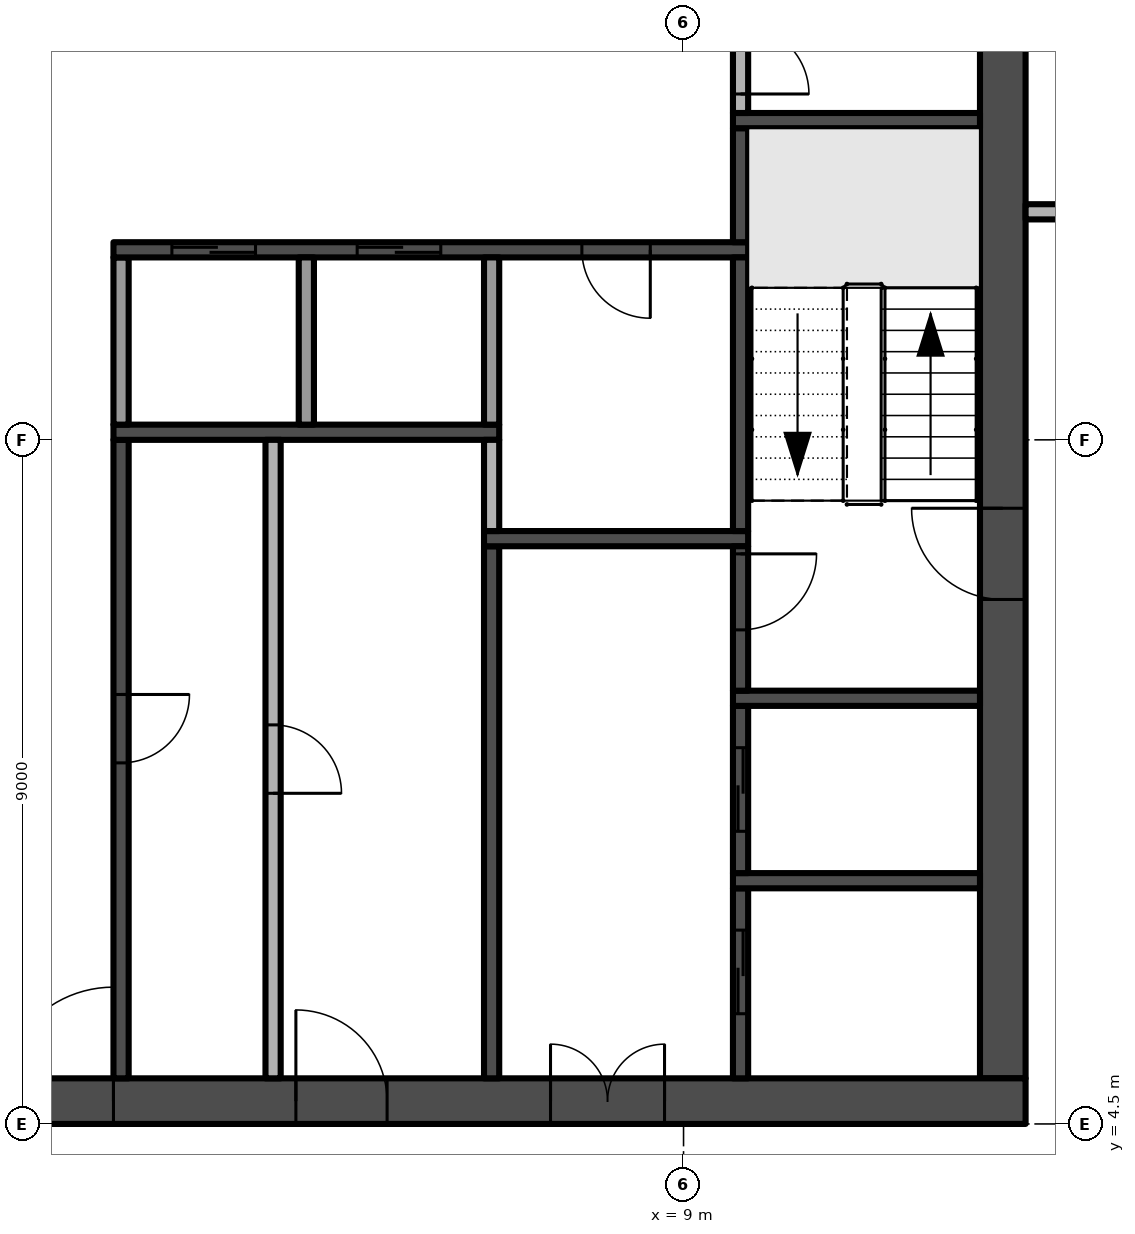
"""IFC4 building model, lengths in metres.
Left out: names, types, materials, properties, quantities, classifications, styles, units other than length and angle.
Written with IfcOpenShell. Run it as: python <this file> out.ifc"""

import sys

from ifc_helpers import new_model, si_unit, direction, frame, frame_2d, origin, place, context, subcontext, project, spatial, rectangle, extrude, element, fill, save


model = new_model("IFC4")
c1 = context("Model", 3, precision=1e-05, world=origin(), true_north=direction((0.0, 1.0)))
c2 = subcontext(c1, "Body", "Model", "MODEL_VIEW")
j1 = project(units=[si_unit("LENGTHUNIT", "METRE"), si_unit("PLANEANGLEUNIT", "RADIAN")], contexts=[c1])
p1 = place(None, origin())
s1 = spatial("IfcSite", under=j1, at=p1, CompositionType="ELEMENT")
p2 = place(p1, origin())
s2 = spatial("IfcBuilding", under=s1, at=p2, CompositionType="ELEMENT")
p3 = place(p2, frame((0.0, 0.0, 188.2)))
s3 = spatial("IfcBuildingStorey", under=s2, at=p3, CompositionType="ELEMENT", Elevation=188.2)
p4 = place(p3, frame((-13.5, 4.8, -0.3), z_axis=(0.0, 0.0, 1.0), x_axis=(1.0, 0.0, 0.0)))
e1 = element("IfcWall", 1, at=p4, inside=s3, PredefinedType="SHEAR", context=c2, shape_type="SweptSolid", body=[
    extrude(rectangle(XDim=27.0, YDim=0.6, at=frame_2d((13.5, 0.0))), origin(), (0.0, 0.0, 1.0), 3.8),
])
p5 = place(p4, frame((12.0, 0.0, 0.3)))
e2 = element("IfcOpeningElement", 2, at=p5, cuts=e1, PredefinedType="OPENING", context=c2, shape_type="SweptSolid", body=[
    extrude(rectangle(XDim=3.0, YDim=2.4, at=frame_2d((1.5, 1.2))), frame((0.0, 0.31, 0.0), z_axis=(0.0, -1.0, 0.0), x_axis=(1.0, 0.0, 0.0)), (0.0, 0.0, 1.0), 0.62),
])
p6 = place(p4, frame((4.9, 0.0, 0.3)))
e3 = element("IfcOpeningElement", 3, at=p6, cuts=e1, PredefinedType="OPENING", context=c2, shape_type="SweptSolid", body=[
    extrude(rectangle(XDim=1.2, YDim=2.2, at=frame_2d((0.6, 1.1))), frame((0.0, 0.31, 0.0), z_axis=(0.0, -1.0, 0.0), x_axis=(1.0, 0.0, 0.0)), (0.0, 0.0, 1.0), 0.62),
])
p7 = place(p4, frame((20.75, 0.0, 0.3)))
e4 = element("IfcOpeningElement", 4, at=p7, cuts=e1, PredefinedType="OPENING", context=c2, shape_type="SweptSolid", body=[
    extrude(rectangle(XDim=1.5, YDim=2.2, at=frame_2d((0.75, 1.1))), frame((0.0, 0.31, 0.0), z_axis=(0.0, -1.0, 0.0), x_axis=(1.0, 0.0, 0.0)), (0.0, 0.0, 1.0), 0.62),
])
p8 = place(p4, frame((17.4, 0.0, 0.3)))
e5 = element("IfcOpeningElement", 5, at=p8, cuts=e1, PredefinedType="OPENING", context=c2, shape_type="SweptSolid", body=[
    extrude(rectangle(XDim=1.2, YDim=2.2, at=frame_2d((0.6, 1.1))), frame((0.0, 0.31, 0.0), z_axis=(0.0, -1.0, 0.0), x_axis=(1.0, 0.0, 0.0)), (0.0, 0.0, 1.0), 0.62),
])
p9 = place(p3, frame((13.2, 5.1, -0.3), z_axis=(0.0, 0.0, 1.0), x_axis=(0.0, 1.0, 0.0)))
e6 = element("IfcWall", 6, at=p9, inside=s3, PredefinedType="SHEAR", context=c2, shape_type="SweptSolid", body=[
    extrude(rectangle(XDim=16.8, YDim=0.6, at=frame_2d((8.4, 0.0))), origin(), (0.0, 0.0, 1.0), 3.8),
])
p10 = place(p9, frame((6.3, 0.0, 0.3)))
e7 = element("IfcOpeningElement", 7, at=p10, cuts=e6, PredefinedType="OPENING", context=c2, shape_type="SweptSolid", body=[
    extrude(rectangle(XDim=1.2, YDim=2.2, at=frame_2d((0.6, 1.1))), frame((0.0, 0.31, 0.0), z_axis=(0.0, -1.0, 0.0), x_axis=(1.0, 0.0, 0.0)), (0.0, 0.0, 1.0), 0.62),
])
p11 = place(p3, frame((1.6, 13.5, 0.0), z_axis=(0.0, 0.0, 1.0), x_axis=(0.0, -1.0, 0.0)))
e8 = element("IfcWall", 8, at=p11, inside=s3, PredefinedType="SHEAR", context=c2, shape_type="SweptSolid", body=[
    extrude(rectangle(XDim=8.4, YDim=0.2, at=frame_2d((4.2, 0.0))), origin(), (0.0, 0.0, 1.0), 3.5),
])
p12 = place(p11, frame((3.35, 0.0, 0.0)))
e9 = element("IfcOpeningElement", 9, at=p12, cuts=e8, PredefinedType="OPENING", context=c2, shape_type="SweptSolid", body=[
    extrude(rectangle(XDim=0.9, YDim=2.1, at=frame_2d((0.45, 1.05))), frame((0.0, 0.11, 0.0), z_axis=(0.0, -1.0, 0.0), x_axis=(1.0, 0.0, 0.0)), (0.0, 0.0, 1.0), 0.22),
])
p13 = place(p3, frame((1.5, 13.6, 0.0), z_axis=(0.0, 0.0, 1.0), x_axis=(1.0, 0.0, 0.0)))
e10 = element("IfcWall", 10, at=p13, inside=s3, PredefinedType="SHEAR", context=c2, shape_type="SweptSolid", body=[
    extrude(rectangle(XDim=5.075, YDim=0.2, at=frame_2d((2.538, 0.0))), origin(), (0.0, 0.0, 1.0), 3.5),
])
p14 = place(p3, frame((1.6, 13.7, 0.0), z_axis=(0.0, 0.0, 1.0), x_axis=(0.0, 1.0, 0.0)))
e11 = element("IfcWall", 11, at=p14, inside=s3, PredefinedType="PARTITIONING", context=c2, shape_type="SweptSolid", body=[
    extrude(rectangle(XDim=2.2, YDim=0.2, at=frame_2d((1.1, 0.0))), origin(), (0.0, 0.0, 1.0), 3.5),
])
p15 = place(p3, frame((9.85, 16.0, 0.0), z_axis=(0.0, 0.0, 1.0), x_axis=(-1.0, 0.0, 0.0)))
e12 = element("IfcWall", 12, at=p15, inside=s3, PredefinedType="SHEAR", context=c2, shape_type="SweptSolid", body=[
    extrude(rectangle(XDim=8.35, YDim=0.2, at=frame_2d((4.175, 0.0))), origin(), (0.0, 0.0, 1.0), 3.5),
])
p16 = place(p15, frame((6.481, 0.0, 0.0)))
e13 = element("IfcOpeningElement", 13, at=p16, cuts=e12, PredefinedType="OPENING", context=c2, shape_type="SweptSolid", body=[
    extrude(rectangle(XDim=1.1, YDim=2.1, at=frame_2d((0.55, 1.05))), frame((0.0, 0.11, 0.0), z_axis=(0.0, -1.0, 0.0), x_axis=(1.0, 0.0, 0.0)), (0.0, 0.0, 1.0), 0.22),
])
p17 = place(p15, frame((4.044, 0.0, 0.0)))
e14 = element("IfcOpeningElement", 14, at=p17, cuts=e12, PredefinedType="OPENING", context=c2, shape_type="SweptSolid", body=[
    extrude(rectangle(XDim=1.1, YDim=2.1, at=frame_2d((0.55, 1.05))), frame((0.0, 0.11, 0.0), z_axis=(0.0, -1.0, 0.0), x_axis=(1.0, 0.0, 0.0)), (0.0, 0.0, 1.0), 0.22),
])
p18 = place(p15, frame((1.288, 0.0, 0.0)))
e15 = element("IfcOpeningElement", 15, at=p18, cuts=e12, PredefinedType="OPENING", context=c2, shape_type="SweptSolid", body=[
    extrude(rectangle(XDim=0.9, YDim=2.1, at=frame_2d((0.45, 1.05))), frame((0.0, 0.11, 0.0), z_axis=(0.0, -1.0, 0.0), x_axis=(1.0, 0.0, 0.0)), (0.0, 0.0, 1.0), 0.22),
])
p19 = place(p3, frame((3.6, 13.5, 0.0), z_axis=(0.0, 0.0, 1.0), x_axis=(0.0, -1.0, 0.0)))
e16 = element("IfcWall", 16, at=p19, inside=s3, PredefinedType="PARTITIONING", context=c2, shape_type="SweptSolid", body=[
    extrude(rectangle(XDim=8.4, YDim=0.2, at=frame_2d((4.2, 0.0))), origin(), (0.0, 0.0, 1.0), 3.5),
])
p20 = place(p19, frame((3.75, 0.0, 0.0)))
e17 = element("IfcOpeningElement", 17, at=p20, cuts=e16, PredefinedType="OPENING", context=c2, shape_type="SweptSolid", body=[
    extrude(rectangle(XDim=0.9, YDim=2.1, at=frame_2d((0.45, 1.05))), frame((0.0, 0.11, 0.0), z_axis=(0.0, -1.0, 0.0), x_axis=(1.0, 0.0, 0.0)), (0.0, 0.0, 1.0), 0.22),
])
p21 = place(p3, frame((4.037, 13.7, 0.0), z_axis=(0.0, 0.0, 1.0), x_axis=(0.0, 1.0, 0.0)))
e18 = element("IfcWall", 18, at=p21, inside=s3, PredefinedType="PARTITIONING", context=c2, shape_type="SweptSolid", body=[
    extrude(rectangle(XDim=2.2, YDim=0.2, at=frame_2d((1.1, 0.0))), origin(), (0.0, 0.0, 1.0), 3.5),
])
p22 = place(p3, frame((6.475, 5.1, 0.0), z_axis=(0.0, 0.0, 1.0), x_axis=(0.0, 1.0, 0.0)))
e19 = element("IfcWall", 19, at=p22, inside=s3, PredefinedType="SHEAR", context=c2, shape_type="SweptSolid", body=[
    extrude(rectangle(XDim=7.0, YDim=0.2, at=frame_2d((3.5, 0.0))), origin(), (0.0, 0.0, 1.0), 3.5),
])
p23 = place(p3, frame((6.375, 12.2, 0.0), z_axis=(0.0, 0.0, 1.0), x_axis=(1.0, 0.0, 0.0)))
e20 = element("IfcWall", 20, at=p23, inside=s3, PredefinedType="SHEAR", context=c2, shape_type="SweptSolid", body=[
    extrude(rectangle(XDim=3.475, YDim=0.2, at=frame_2d((1.738, 0.0))), origin(), (0.0, 0.0, 1.0), 3.5),
])
p24 = place(p3, frame((6.475, 12.3, 0.0), z_axis=(0.0, 0.0, 1.0), x_axis=(0.0, 1.0, 0.0)))
e21 = element("IfcWall", 21, at=p24, inside=s3, PredefinedType="PARTITIONING", context=c2, shape_type="SweptSolid", body=[
    extrude(rectangle(XDim=1.2, YDim=0.2, at=frame_2d((0.6, 0.0))), origin(), (0.0, 0.0, 1.0), 3.5),
])
p25 = place(p3, frame((6.475, 13.7, 0.0), z_axis=(0.0, 0.0, 1.0), x_axis=(0.0, 1.0, 0.0)))
e22 = element("IfcWall", 22, at=p25, inside=s3, PredefinedType="PARTITIONING", context=c2, shape_type="SweptSolid", body=[
    extrude(rectangle(XDim=2.2, YDim=0.2, at=frame_2d((1.1, 0.0))), origin(), (0.0, 0.0, 1.0), 3.5),
])
p26 = place(p3, frame((9.75, 5.1, 0.0), z_axis=(0.0, 0.0, 1.0), x_axis=(0.0, 1.0, 0.0)))
e23 = element("IfcWall", 23, at=p26, inside=s3, PredefinedType="SHEAR", context=c2, shape_type="SweptSolid", body=[
    extrude(rectangle(XDim=2.5, YDim=0.2, at=frame_2d((1.25, 0.0))), origin(), (0.0, 0.0, 1.0), 3.5),
])
p27 = place(p26, frame((0.85, 0.0, 0.0)))
e24 = element("IfcOpeningElement", 24, at=p27, cuts=e23, PredefinedType="OPENING", context=c2, shape_type="SweptSolid", body=[
    extrude(rectangle(XDim=1.1, YDim=2.1, at=frame_2d((0.55, 1.05))), frame((0.0, 0.11, 0.0), z_axis=(0.0, -1.0, 0.0), x_axis=(1.0, 0.0, 0.0)), (0.0, 0.0, 1.0), 0.22),
])
p28 = place(p3, frame((9.65, 7.7, 0.0), z_axis=(0.0, 0.0, 1.0), x_axis=(1.0, 0.0, 0.0)))
e25 = element("IfcWall", 25, at=p28, inside=s3, PredefinedType="SHEAR", context=c2, shape_type="SweptSolid", body=[
    extrude(rectangle(XDim=3.25, YDim=0.2, at=frame_2d((1.625, 0.0))), origin(), (0.0, 0.0, 1.0), 3.5),
])
p29 = place(p3, frame((9.75, 7.8, 0.0), z_axis=(0.0, 0.0, 1.0), x_axis=(0.0, 1.0, 0.0)))
e26 = element("IfcWall", 26, at=p29, inside=s3, PredefinedType="SHEAR", context=c2, shape_type="SweptSolid", body=[
    extrude(rectangle(XDim=2.2, YDim=0.2, at=frame_2d((1.1, 0.0))), origin(), (0.0, 0.0, 1.0), 3.5),
])
p30 = place(p29, frame((0.55, 0.0, 0.0)))
e27 = element("IfcOpeningElement", 27, at=p30, cuts=e26, PredefinedType="OPENING", context=c2, shape_type="SweptSolid", body=[
    extrude(rectangle(XDim=1.1, YDim=2.1, at=frame_2d((0.55, 1.05))), frame((0.0, 0.11, 0.0), z_axis=(0.0, -1.0, 0.0), x_axis=(1.0, 0.0, 0.0)), (0.0, 0.0, 1.0), 0.22),
])
p31 = place(p3, frame((9.65, 10.1, 0.0), z_axis=(0.0, 0.0, 1.0), x_axis=(1.0, 0.0, 0.0)))
e28 = element("IfcWall", 28, at=p31, inside=s3, PredefinedType="SHEAR", context=c2, shape_type="SweptSolid", body=[
    extrude(rectangle(XDim=3.25, YDim=0.2, at=frame_2d((1.625, 0.0))), origin(), (0.0, 0.0, 1.0), 3.5),
])
p32 = place(p3, frame((9.75, 12.1, 0.0), z_axis=(0.0, 0.0, 1.0), x_axis=(0.0, -1.0, 0.0)))
e29 = element("IfcWall", 29, at=p32, inside=s3, PredefinedType="SHEAR", context=c2, shape_type="SweptSolid", body=[
    extrude(rectangle(XDim=1.9, YDim=0.2, at=frame_2d((0.95, 0.0))), origin(), (0.0, 0.0, 1.0), 3.5),
])
p33 = place(p32, frame((0.1, 0.0, 0.0)))
e30 = element("IfcOpeningElement", 30, at=p33, cuts=e29, PredefinedType="OPENING", context=c2, shape_type="SweptSolid", body=[
    extrude(rectangle(XDim=1.0, YDim=2.2, at=frame_2d((0.5, 1.1))), frame((0.0, 0.11, 0.0), z_axis=(0.0, -1.0, 0.0), x_axis=(1.0, 0.0, 0.0)), (0.0, 0.0, 1.0), 0.22),
])
p34 = place(p3, frame((9.75, 12.3, 0.0), z_axis=(0.0, 0.0, 1.0), x_axis=(0.0, 1.0, 0.0)))
e31 = element("IfcWall", 31, at=p34, inside=s3, PredefinedType="SHEAR", context=c2, shape_type="SweptSolid", body=[
    extrude(rectangle(XDim=3.6, YDim=0.2, at=frame_2d((1.8, 0.0))), origin(), (0.0, 0.0, 1.0), 3.5),
])
p35 = place(p3, frame((9.75, 16.1, 0.0), z_axis=(0.0, 0.0, 1.0), x_axis=(0.0, 1.0, 0.0)))
e32 = element("IfcWall", 32, at=p35, inside=s3, PredefinedType="SHEAR", context=c2, shape_type="SweptSolid", body=[
    extrude(rectangle(XDim=1.5, YDim=0.2, at=frame_2d((0.75, 0.0))), origin(), (0.0, 0.0, 1.0), 3.5),
])
p36 = place(p3, frame((9.65, 17.7, 0.0), z_axis=(0.0, 0.0, 1.0), x_axis=(1.0, 0.0, 0.0)))
e33 = element("IfcWall", 33, at=p36, inside=s3, PredefinedType="SHEAR", context=c2, shape_type="SweptSolid", body=[
    extrude(rectangle(XDim=3.25, YDim=0.2, at=frame_2d((1.625, 0.0))), origin(), (0.0, 0.0, 1.0), 3.5),
])
p37 = place(p3, frame((9.75, 19.2, 0.0), z_axis=(0.0, 0.0, 1.0), x_axis=(0.0, -1.0, 0.0)))
e34 = element("IfcWall", 34, at=p37, inside=s3, PredefinedType="PARTITIONING", context=c2, shape_type="SweptSolid", body=[
    extrude(rectangle(XDim=1.4, YDim=0.2, at=frame_2d((0.7, 0.0))), origin(), (0.0, 0.0, 1.0), 3.5),
])
p38 = place(p37, frame((0.25, 0.0, 0.0)))
e35 = element("IfcOpeningElement", 35, at=p38, cuts=e34, PredefinedType="OPENING", context=c2, shape_type="SweptSolid", body=[
    extrude(rectangle(XDim=0.9, YDim=2.1, at=frame_2d((0.45, 1.05))), frame((0.0, 0.11, 0.0), z_axis=(0.0, -1.0, 0.0), x_axis=(1.0, 0.0, 0.0)), (0.0, 0.0, 1.0), 0.22),
])
p39 = place(p3, frame((13.5, 16.5, 0.0), z_axis=(0.0, 0.0, 1.0), x_axis=(1.0, 0.0, 0.0)))
e36 = element("IfcWall", 36, at=p39, inside=s3, PredefinedType="PARTITIONING", context=c2, shape_type="SweptSolid", body=[
    extrude(rectangle(XDim=3.825, YDim=0.2, at=frame_2d((1.913, 0.0))), origin(), (0.0, 0.0, 1.0), 3.5),
])
p40 = place(p39, frame((1.55, 0.0, 0.0)))
e37 = element("IfcOpeningElement", 37, at=p40, cuts=e36, PredefinedType="OPENING", context=c2, shape_type="SweptSolid", body=[
    extrude(rectangle(XDim=0.9, YDim=2.1, at=frame_2d((0.45, 1.05))), frame((0.0, 0.11, 0.0), z_axis=(0.0, -1.0, 0.0), x_axis=(1.0, 0.0, 0.0)), (0.0, 0.0, 1.0), 0.22),
])
p41 = place(p5, frame((3.0, 0.0, 0.0), z_axis=(0.0, 0.0, 1.0), x_axis=(-1.0, 0.0, 0.0)))
e38 = element("IfcDoor", 38, at=p41, inside=s3, OperationType="DOUBLE_DOOR_SINGLE_SWING", PredefinedType="DOOR", context=c2, shape_type="SweptSolid", body=[
    extrude(rectangle(XDim=3.0, YDim=2.4, at=frame_2d((1.5, 1.2))), frame((0.0, 0.025, 0.0), z_axis=(0.0, -1.0, 0.0), x_axis=(1.0, 0.0, 0.0)), (0.0, 0.0, 1.0), 0.05),
])
fill(e2, e38)
p42 = place(p10, frame((1.2, 0.0, 0.0), z_axis=(0.0, 0.0, 1.0), x_axis=(-1.0, 0.0, 0.0)))
e39 = element("IfcDoor", 39, at=p42, inside=s3, OperationType="SINGLE_SWING_LEFT", PredefinedType="DOOR", context=c2, shape_type="SweptSolid", body=[
    extrude(rectangle(XDim=1.2, YDim=2.2, at=frame_2d((0.6, 1.1))), frame((0.0, 0.025, 0.0), z_axis=(0.0, -1.0, 0.0), x_axis=(1.0, 0.0, 0.0)), (0.0, 0.0, 1.0), 0.05),
])
fill(e7, e39)
p43 = place(p7, frame((1.5, 0.0, 0.0), z_axis=(0.0, 0.0, 1.0), x_axis=(-1.0, 0.0, 0.0)))
e40 = element("IfcDoor", 40, at=p43, inside=s3, OperationType="DOUBLE_DOOR_SINGLE_SWING", PredefinedType="DOOR", context=c2, shape_type="SweptSolid", body=[
    extrude(rectangle(XDim=1.5, YDim=2.2, at=frame_2d((0.75, 1.1))), frame((0.0, 0.025, 0.0), z_axis=(0.0, -1.0, 0.0), x_axis=(1.0, 0.0, 0.0)), (0.0, 0.0, 1.0), 0.05),
])
fill(e4, e40)
p44 = place(p8, frame((1.2, 0.0, 0.0), z_axis=(0.0, 0.0, 1.0), x_axis=(-1.0, 0.0, 0.0)))
e41 = element("IfcDoor", 41, at=p44, inside=s3, OperationType="SINGLE_SWING_RIGHT", PredefinedType="DOOR", context=c2, shape_type="SweptSolid", body=[
    extrude(rectangle(XDim=1.2, YDim=2.2, at=frame_2d((0.6, 1.1))), frame((0.0, 0.025, 0.0), z_axis=(0.0, -1.0, 0.0), x_axis=(1.0, 0.0, 0.0)), (0.0, 0.0, 1.0), 0.05),
])
fill(e5, e41)
p45 = place(p33, origin())
e42 = element("IfcDoor", 42, at=p45, inside=s3, OperationType="SINGLE_SWING_LEFT", PredefinedType="DOOR", context=c2, shape_type="SweptSolid", body=[
    extrude(rectangle(XDim=1.0, YDim=2.2, at=frame_2d((0.5, 1.1))), frame((0.0, 0.025, 0.0), z_axis=(0.0, -1.0, 0.0), x_axis=(1.0, 0.0, 0.0)), (0.0, 0.0, 1.0), 0.05),
])
fill(e30, e42)
p46 = place(p16, origin())
e43 = element("IfcDoor", 43, at=p46, inside=s3, OperationType="SLIDING_TO_RIGHT", PredefinedType="DOOR", context=c2, shape_type="SweptSolid", body=[
    extrude(rectangle(XDim=1.1, YDim=2.1, at=frame_2d((0.55, 1.05))), frame((0.0, 0.025, 0.0), z_axis=(0.0, -1.0, 0.0), x_axis=(1.0, 0.0, 0.0)), (0.0, 0.0, 1.0), 0.05),
])
fill(e13, e43)
p47 = place(p17, origin())
e44 = element("IfcDoor", 44, at=p47, inside=s3, OperationType="SLIDING_TO_RIGHT", PredefinedType="DOOR", context=c2, shape_type="SweptSolid", body=[
    extrude(rectangle(XDim=1.1, YDim=2.1, at=frame_2d((0.55, 1.05))), frame((0.0, 0.025, 0.0), z_axis=(0.0, -1.0, 0.0), x_axis=(1.0, 0.0, 0.0)), (0.0, 0.0, 1.0), 0.05),
])
fill(e14, e44)
p48 = place(p27, origin())
e45 = element("IfcDoor", 45, at=p48, inside=s3, OperationType="SLIDING_TO_RIGHT", PredefinedType="DOOR", context=c2, shape_type="SweptSolid", body=[
    extrude(rectangle(XDim=1.1, YDim=2.1, at=frame_2d((0.55, 1.05))), frame((0.0, 0.025, 0.0), z_axis=(0.0, -1.0, 0.0), x_axis=(1.0, 0.0, 0.0)), (0.0, 0.0, 1.0), 0.05),
])
fill(e24, e45)
p49 = place(p30, origin())
e46 = element("IfcDoor", 46, at=p49, inside=s3, OperationType="SLIDING_TO_RIGHT", PredefinedType="DOOR", context=c2, shape_type="SweptSolid", body=[
    extrude(rectangle(XDim=1.1, YDim=2.1, at=frame_2d((0.55, 1.05))), frame((0.0, 0.025, 0.0), z_axis=(0.0, -1.0, 0.0), x_axis=(1.0, 0.0, 0.0)), (0.0, 0.0, 1.0), 0.05),
])
fill(e27, e46)
p50 = place(p12, origin())
e47 = element("IfcDoor", 47, at=p50, inside=s3, OperationType="SINGLE_SWING_LEFT", PredefinedType="DOOR", context=c2, shape_type="SweptSolid", body=[
    extrude(rectangle(XDim=0.9, YDim=2.1, at=frame_2d((0.45, 1.05))), frame((0.0, 0.025, 0.0), z_axis=(0.0, -1.0, 0.0), x_axis=(1.0, 0.0, 0.0)), (0.0, 0.0, 1.0), 0.05),
])
fill(e9, e47)
p51 = place(p18, origin())
e48 = element("IfcDoor", 48, at=p51, inside=s3, OperationType="SINGLE_SWING_LEFT", PredefinedType="DOOR", context=c2, shape_type="SweptSolid", body=[
    extrude(rectangle(XDim=0.9, YDim=2.1, at=frame_2d((0.45, 1.05))), frame((0.0, 0.025, 0.0), z_axis=(0.0, -1.0, 0.0), x_axis=(1.0, 0.0, 0.0)), (0.0, 0.0, 1.0), 0.05),
])
fill(e15, e48)
p52 = place(p38, origin())
e49 = element("IfcDoor", 49, at=p52, inside=s3, OperationType="SINGLE_SWING_RIGHT", PredefinedType="DOOR", context=c2, shape_type="SweptSolid", body=[
    extrude(rectangle(XDim=0.9, YDim=2.1, at=frame_2d((0.45, 1.05))), frame((0.0, 0.025, 0.0), z_axis=(0.0, -1.0, 0.0), x_axis=(1.0, 0.0, 0.0)), (0.0, 0.0, 1.0), 0.05),
])
fill(e35, e49)
p53 = place(p20, origin())
e50 = element("IfcDoor", 50, at=p53, inside=s3, OperationType="SINGLE_SWING_RIGHT", PredefinedType="DOOR", context=c2, shape_type="SweptSolid", body=[
    extrude(rectangle(XDim=0.9, YDim=2.1, at=frame_2d((0.45, 1.05))), frame((0.0, 0.025, 0.0), z_axis=(0.0, -1.0, 0.0), x_axis=(1.0, 0.0, 0.0)), (0.0, 0.0, 1.0), 0.05),
])
fill(e17, e50)
save(model, sys.argv[1])
